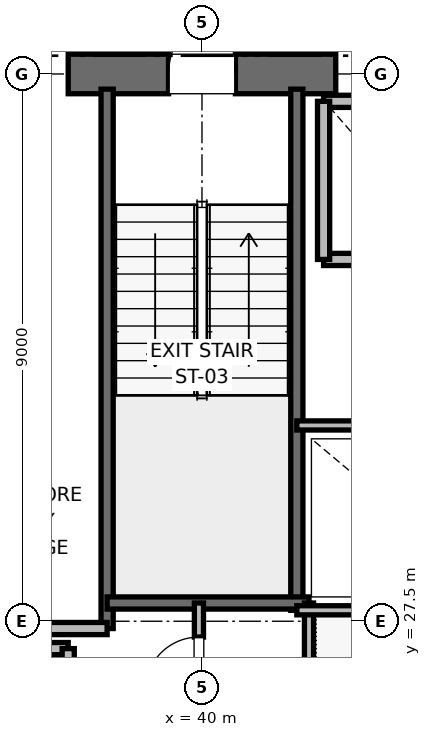
"""IFC4 building model, lengths in metres.
Left out: names, types, materials, properties, quantities, classifications, styles, units other than length and angle.
Written with IfcOpenShell. Run it as: python <this file> out.ifc"""

import sys

from ifc_helpers import new_model, si_unit, direction, frame, frame_2d, origin, place, context, subcontext, project, spatial, rectangle, extrude, element, fill, save


model = new_model("IFC4")
c1 = context("Model", 3, precision=1e-05, world=origin(), true_north=direction((0.0, 1.0)))
c2 = subcontext(c1, "Body", "Model", "MODEL_VIEW")
j1 = project(units=[si_unit("LENGTHUNIT", "METRE"), si_unit("PLANEANGLEUNIT", "RADIAN")], contexts=[c1])
p1 = place(None, origin())
s1 = spatial("IfcSite", under=j1, at=p1, CompositionType="ELEMENT")
p2 = place(p1, origin())
s2 = spatial("IfcBuilding", under=s1, at=p2, CompositionType="ELEMENT")
p3 = place(p2, frame((0.0, 0.0, 55.6)))
s3 = spatial("IfcBuildingStorey", under=s2, at=p3, CompositionType="ELEMENT", Elevation=55.6)
p4 = place(p3, frame((37.8, 36.5, 0.0), z_axis=(0.0, 0.0, 1.0), x_axis=(1.0, 0.0, 0.0)))
e1 = element("IfcWall", 1, at=p4, inside=s3, PredefinedType="SHEAR", context=c2, shape_type="SweptSolid", body=[
    extrude(rectangle(XDim=4.4, YDim=0.65, at=frame_2d((2.2, 0.0))), origin(), (0.0, 0.0, 1.0), 3.76),
])
p5 = place(p4, frame((1.65, 0.0, 0.0)))
e2 = element("IfcOpeningElement", 2, at=p5, cuts=e1, PredefinedType="OPENING", context=c2, shape_type="SweptSolid", body=[
    extrude(rectangle(XDim=1.1, YDim=2.15, at=frame_2d((0.55, 1.075))), frame((0.0, 0.325, 0.0), z_axis=(0.0, -1.0, 0.0), x_axis=(1.0, 0.0, 0.0)), (0.0, 0.0, 1.0), 0.65),
])
p6 = place(p3, frame((38.44, 27.38, 0.0), z_axis=(0.0, 0.0, 1.0), x_axis=(0.0, 1.0, 0.0)))
e3 = element("IfcWall", 3, at=p6, inside=s3, PredefinedType="SOLIDWALL", context=c2, shape_type="SweptSolid", body=[
    extrude(rectangle(XDim=8.87, YDim=0.2, at=frame_2d((4.435, 0.0))), origin(), (0.0, 0.0, 1.0), 3.76),
])
p7 = place(p3, frame((41.56, 27.68, 0.0), z_axis=(0.0, 0.0, 1.0), x_axis=(0.0, 1.0, 0.0)))
e4 = element("IfcWall", 4, at=p7, inside=s3, PredefinedType="SOLIDWALL", context=c2, shape_type="SweptSolid", body=[
    extrude(rectangle(XDim=8.57, YDim=0.2, at=frame_2d((4.285, 0.0))), origin(), (0.0, 0.0, 1.0), 3.76),
])
p8 = place(p3, frame((38.44, 27.8, 0.0), z_axis=(0.0, 0.0, 1.0), x_axis=(1.0, 0.0, 0.0)))
e5 = element("IfcWall", 5, at=p8, inside=s3, PredefinedType="SOLIDWALL", context=c2, shape_type="SweptSolid", body=[
    extrude(rectangle(XDim=3.32, YDim=0.2, at=frame_2d((1.66, 0.0))), origin(), (0.0, 0.0, 1.0), 3.76),
])
p9 = place(p3, frame((32.82, 27.38, 0.0), z_axis=(0.0, 0.0, 1.0), x_axis=(1.0, 0.0, 0.0)))
e6 = element("IfcWall", 6, at=p9, inside=s3, PredefinedType="PARTITIONING", context=c2, shape_type="SweptSolid", body=[
    extrude(rectangle(XDim=5.62, YDim=0.2, at=frame_2d((2.81, 0.0))), origin(), (0.0, 0.0, 1.0), 3.76),
])
p10 = place(p3, frame((37.8, 27.05, 0.0), z_axis=(0.0, 0.0, 1.0), x_axis=(-1.0, 0.0, 0.0)))
e7 = element("IfcWall", 7, at=p10, inside=s3, PredefinedType="SOLIDWALL", context=c2, shape_type="SweptSolid", body=[
    extrude(rectangle(XDim=2.3, YDim=0.2, at=frame_2d((1.15, 0.0))), origin(), (0.0, 0.0, 1.0), 3.76),
])
p11 = place(p3, frame((37.8, 24.45, 0.0), z_axis=(0.0, 0.0, 1.0), x_axis=(0.0, 1.0, 0.0)))
e8 = element("IfcWall", 8, at=p11, inside=s3, PredefinedType="SOLIDWALL", context=c2, shape_type="SweptSolid", body=[
    extrude(rectangle(XDim=2.6, YDim=0.2, at=frame_2d((1.3, 0.0))), origin(), (0.0, 0.0, 1.0), 3.76),
])
p12 = place(p3, frame((42.0, 33.45, 0.0), z_axis=(0.0, 0.0, 1.0), x_axis=(1.0, 0.0, 0.0)))
e9 = element("IfcWall", 9, at=p12, inside=s3, PredefinedType="SOLIDWALL", context=c2, shape_type="SweptSolid", body=[
    extrude(rectangle(XDim=2.3, YDim=0.2, at=frame_2d((1.15, 0.0))), origin(), (0.0, 0.0, 1.0), 3.76),
])
p13 = place(p3, frame((44.3, 36.05, 0.0), z_axis=(0.0, 0.0, 1.0), x_axis=(-1.0, 0.0, 0.0)))
e10 = element("IfcWall", 10, at=p13, inside=s3, PredefinedType="SOLIDWALL", context=c2, shape_type="SweptSolid", body=[
    extrude(rectangle(XDim=2.3, YDim=0.2, at=frame_2d((1.15, 0.0))), origin(), (0.0, 0.0, 1.0), 2.54),
])
p14 = place(p3, frame((42.0, 36.05, 0.0), z_axis=(0.0, 0.0, 1.0), x_axis=(0.0, -1.0, 0.0)))
e11 = element("IfcWall", 11, at=p14, inside=s3, PredefinedType="SOLIDWALL", context=c2, shape_type="SweptSolid", body=[
    extrude(rectangle(XDim=2.6, YDim=0.2, at=frame_2d((1.3, 0.0))), origin(), (0.0, 0.0, 1.0), 2.54),
])
p15 = place(p3, frame((41.76, 23.8, 0.0), z_axis=(0.0, 0.0, 1.0), x_axis=(0.0, 1.0, 0.0)))
e12 = element("IfcWall", 12, at=p15, inside=s3, PredefinedType="PARTITIONING", context=c2, shape_type="SweptSolid", body=[
    extrude(rectangle(XDim=4.0, YDim=0.15, at=frame_2d((2.0, 0.0))), origin(), (0.0, 0.0, 1.0), 2.85),
])
p16 = place(p3, frame((39.95, 25.8, 0.0), z_axis=(0.0, 0.0, 1.0), x_axis=(0.0, 1.0, 0.0)))
e13 = element("IfcWall", 13, at=p16, inside=s3, PredefinedType="PARTITIONING", context=c2, shape_type="SweptSolid", body=[
    extrude(rectangle(XDim=2.0, YDim=0.15, at=frame_2d((1.0, 0.0))), origin(), (0.0, 0.0, 1.0), 2.85),
])
p17 = place(p16, frame((0.56, 0.0, 0.0)))
e14 = element("IfcOpeningElement", 14, at=p17, cuts=e13, PredefinedType="OPENING", context=c2, shape_type="SweptSolid", body=[
    extrude(rectangle(XDim=0.88, YDim=2.1, at=frame_2d((0.44, 1.05))), frame((0.0, 0.075, 0.0), z_axis=(0.0, -1.0, 0.0), x_axis=(1.0, 0.0, 0.0)), (0.0, 0.0, 1.0), 0.15),
])
p18 = place(p3, frame((41.56, 27.68, 0.0), z_axis=(0.0, 0.0, 1.0), x_axis=(1.0, 0.0, 0.0)))
e15 = element("IfcWall", 15, at=p18, inside=s3, PredefinedType="PARTITIONING", context=c2, shape_type="SweptSolid", body=[
    extrude(rectangle(XDim=3.59, YDim=0.15, at=frame_2d((1.795, 0.0))), origin(), (0.0, 0.0, 1.0), 2.85),
])
p19 = place(p3, frame((41.56, 30.72, 0.0), z_axis=(0.0, 0.0, 1.0), x_axis=(1.0, 0.0, 0.0)))
e16 = element("IfcWall", 16, at=p19, inside=s3, PredefinedType="PARTITIONING", context=c2, shape_type="SweptSolid", body=[
    extrude(rectangle(XDim=3.59, YDim=0.15, at=frame_2d((1.795, 0.0))), origin(), (0.0, 0.0, 1.0), 2.85),
])
p20 = place(p19, frame((1.355, 0.0, 0.0)))
e17 = element("IfcOpeningElement", 17, at=p20, cuts=e16, PredefinedType="OPENING", context=c2, shape_type="SweptSolid", body=[
    extrude(rectangle(XDim=0.88, YDim=2.1, at=frame_2d((0.44, 1.05))), frame((0.0, 0.075, 0.0), z_axis=(0.0, -1.0, 0.0), x_axis=(1.0, 0.0, 0.0)), (0.0, 0.0, 1.0), 0.15),
])
p21 = place(p5, origin())
e18 = element("IfcDoor", 18, at=p21, inside=s3, OperationType="SINGLE_SWING_RIGHT", PredefinedType="DOOR", context=c2, shape_type="SweptSolid", body=[
    extrude(rectangle(XDim=1.1, YDim=2.15, at=frame_2d((0.55, 1.075))), frame((0.0, 0.025, 0.0), z_axis=(0.0, -1.0, 0.0), x_axis=(1.0, 0.0, 0.0)), (0.0, 0.0, 1.0), 0.05),
])
fill(e2, e18)
p22 = place(p17, origin())
e19 = element("IfcDoor", 19, at=p22, inside=s3, OperationType="SINGLE_SWING_LEFT", PredefinedType="DOOR", context=c2, shape_type="SweptSolid", body=[
    extrude(rectangle(XDim=0.88, YDim=2.1, at=frame_2d((0.44, 1.05))), frame((0.0, 0.025, 0.0), z_axis=(0.0, -1.0, 0.0), x_axis=(1.0, 0.0, 0.0)), (0.0, 0.0, 1.0), 0.05),
])
fill(e14, e19)
save(model, sys.argv[1])
